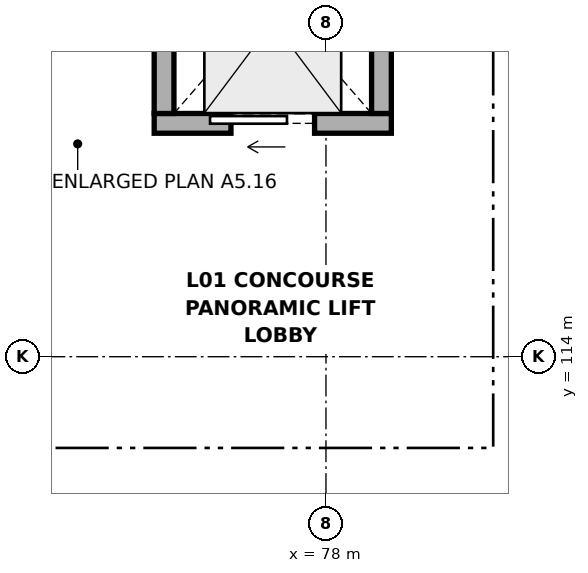
"""IFC4 building model, lengths in metres.
Left out: names, types, materials, properties, quantities, classifications, styles, units other than length and angle.
Written with IfcOpenShell. Run it as: python <this file> out.ifc"""

import sys

from ifc_helpers import new_model, si_unit, direction, frame, frame_2d, origin, place, context, subcontext, project, spatial, rectangle, extrude, element, fill, save


model = new_model("IFC4")
c1 = context("Model", 3, precision=1e-05, world=origin(), true_north=direction((0.0, 1.0)))
c2 = subcontext(c1, "Body", "Model", "MODEL_VIEW")
j1 = project(units=[si_unit("LENGTHUNIT", "METRE"), si_unit("PLANEANGLEUNIT", "RADIAN")], contexts=[c1])
p1 = place(None, origin())
s1 = spatial("IfcSite", under=j1, at=p1, CompositionType="ELEMENT")
p2 = place(p1, origin())
s2 = spatial("IfcBuilding", under=s1, at=p2, CompositionType="ELEMENT")
p3 = place(p2, frame((0.0, 0.0, 5.4)))
s3 = spatial("IfcBuildingStorey", under=s2, at=p3, CompositionType="ELEMENT", Elevation=5.4)
p4 = place(p3, frame((75.74, 117.07, 0.0), z_axis=(0.0, 0.0, 1.0), x_axis=(1.0, 0.0, 0.0)))
e1 = element("IfcWall", 1, at=p4, inside=s3, PredefinedType="SHEAR", context=c2, shape_type="SweptSolid", body=[
    extrude(rectangle(XDim=3.12, YDim=0.26, at=frame_2d((1.56, 0.0))), origin(), (0.0, 0.0, 1.0), 4.2),
])
p5 = place(p4, frame((1.01, 0.0, 0.0)))
e2 = element("IfcOpeningElement", 2, at=p5, cuts=e1, PredefinedType="OPENING", context=c2, shape_type="SweptSolid", body=[
    extrude(rectangle(XDim=1.1, YDim=2.15, at=frame_2d((0.55, 1.075))), frame((0.0, 0.14, 0.0), z_axis=(0.0, -1.0, 0.0), x_axis=(1.0, 0.0, 0.0)), (0.0, 0.0, 1.0), 0.28),
])
for number, where, z_axis, x_axis in (
    (3, (75.87, 117.2, 0.0), (0.0, 0.0, 1.0), (0.0, 1.0, 0.0)),
    (4, (78.73, 117.2, 0.0), (0.0, 0.0, 1.0), (0.0, 1.0, 0.0)),
):
    element("IfcWall", number, at=place(p3, frame(where, z_axis=z_axis, x_axis=x_axis)), inside=s3, PredefinedType="SHEAR", context=c2, shape_type="SweptSolid", body=[
        extrude(rectangle(XDim=3.0, YDim=0.26, at=frame_2d((1.5, 0.0))), origin(), (0.0, 0.0, 1.0), 4.2),
    ])
p6 = place(p5, origin())
e5 = element("IfcDoor", 5, at=p6, inside=s3, OperationType="SLIDING_TO_LEFT", PredefinedType="DOOR", context=c2, shape_type="SweptSolid", body=[
    extrude(rectangle(XDim=1.1, YDim=2.15, at=frame_2d((0.55, 1.075))), frame((0.0, 0.025, 0.0), z_axis=(0.0, -1.0, 0.0), x_axis=(1.0, 0.0, 0.0)), (0.0, 0.0, 1.0), 0.05),
])
fill(e2, e5)
save(model, sys.argv[1])
